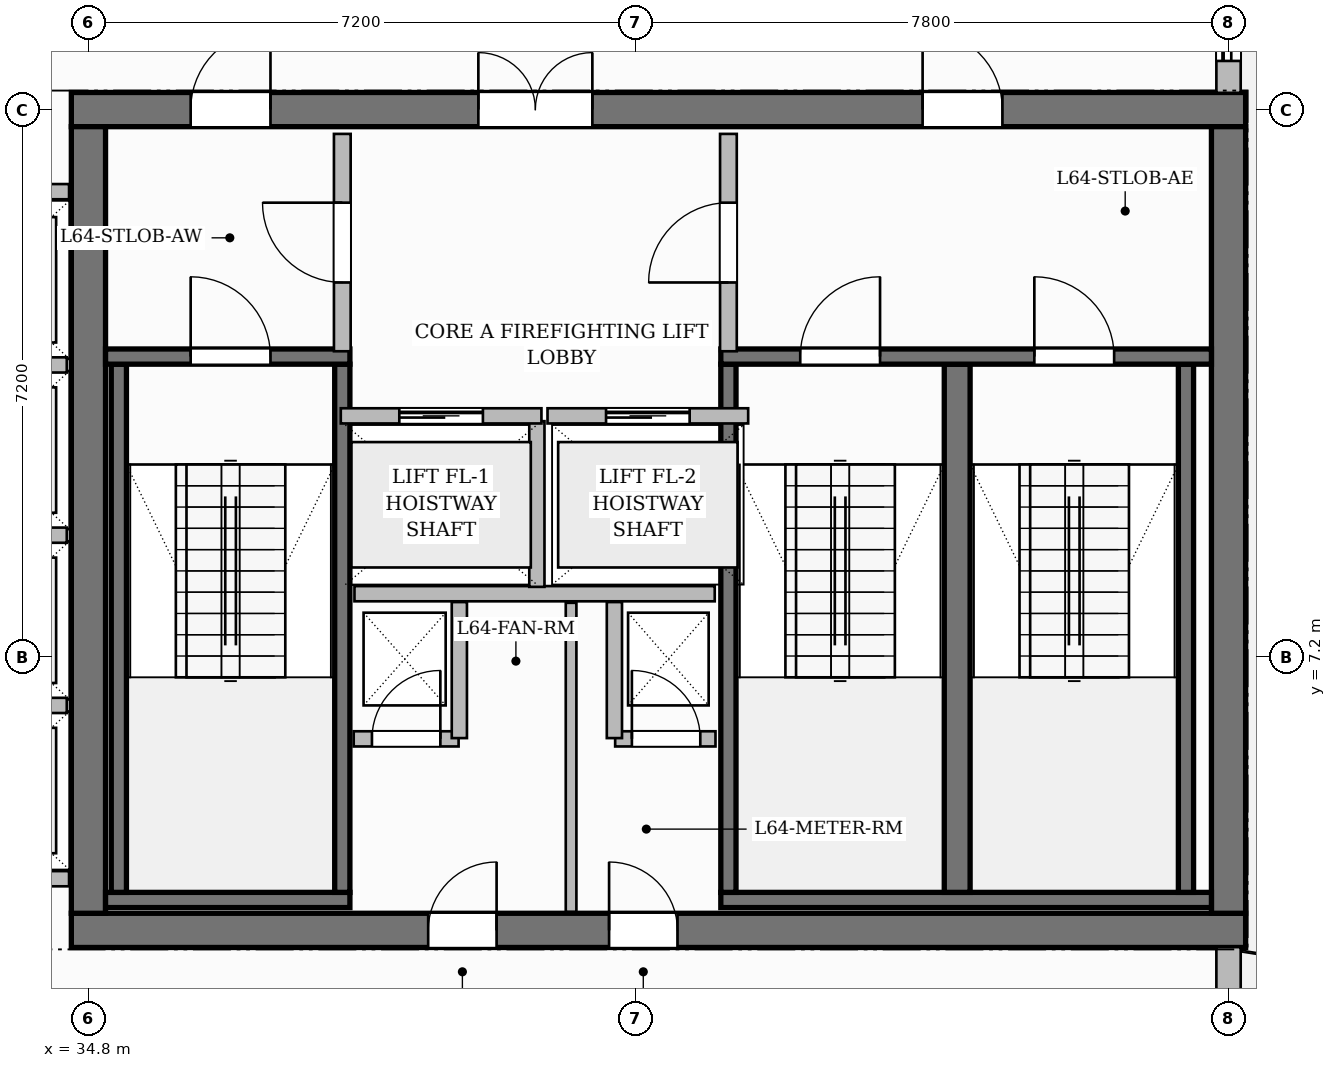
"""IFC4 building model, lengths in metres.
Left out: names, types, materials, properties, quantities, classifications, styles, units other than length and angle.
Written with IfcOpenShell. Run it as: python <this file> out.ifc"""

import sys

from ifc_helpers import new_model, si_unit, direction, frame, frame_2d, origin, place, context, subcontext, project, spatial, rectangle, extrude, source, transform, mapped, element, fill, save


model = new_model("IFC4")
c1 = context("Model", 3, precision=1e-05, world=origin(), true_north=direction((0.0, 1.0)))
c2 = subcontext(c1, "Body", "Model", "MODEL_VIEW")
j1 = project(units=[si_unit("LENGTHUNIT", "METRE"), si_unit("PLANEANGLEUNIT", "RADIAN")], contexts=[c1])
p1 = place(None, origin())
s1 = spatial("IfcSite", under=j1, at=p1, CompositionType="ELEMENT")
p2 = place(p1, origin())
s2 = spatial("IfcBuilding", under=s1, at=p2, CompositionType="ELEMENT")
p3 = place(p2, frame((0.0, 0.0, 255.8)))
s3 = spatial("IfcBuildingStorey", under=s2, at=p3, CompositionType="ELEMENT", Elevation=255.8)
p4 = place(p3, frame((34.575, 3.6, 0.0), z_axis=(0.0, 0.0, 1.0), x_axis=(1.0, 0.0, 0.0)))
e1 = element("IfcWall", 1, at=p4, inside=s3, PredefinedType="SHEAR", context=c2, shape_type="SweptSolid", body=[
    extrude(rectangle(XDim=15.45, YDim=0.45, at=frame_2d((7.725, 0.0))), origin(), (0.0, 0.0, 1.0), 3.85),
])
p5 = place(p4, frame((4.695, 0.0, 0.0)))
e2 = element("IfcOpeningElement", 2, at=p5, cuts=e1, PredefinedType="OPENING", context=c2, shape_type="SweptSolid", body=[
    extrude(rectangle(XDim=0.9, YDim=2.1, at=frame_2d((0.45, 1.05))), frame((0.0, 0.235, 0.0), z_axis=(0.0, -1.0, 0.0), x_axis=(1.0, 0.0, 0.0)), (0.0, 0.0, 1.0), 0.47),
])
p6 = place(p4, frame((7.075, 0.0, 0.0)))
e3 = element("IfcOpeningElement", 3, at=p6, cuts=e1, PredefinedType="OPENING", context=c2, shape_type="SweptSolid", body=[
    extrude(rectangle(XDim=0.9, YDim=2.1, at=frame_2d((0.45, 1.05))), frame((0.0, 0.235, 0.0), z_axis=(0.0, -1.0, 0.0), x_axis=(1.0, 0.0, 0.0)), (0.0, 0.0, 1.0), 0.47),
])
p7 = place(p3, frame((34.575, 14.4, 0.0), z_axis=(0.0, 0.0, 1.0), x_axis=(1.0, 0.0, 0.0)))
e4 = element("IfcWall", 4, at=p7, inside=s3, PredefinedType="SHEAR", context=c2, shape_type="SweptSolid", body=[
    extrude(rectangle(XDim=15.45, YDim=0.45, at=frame_2d((7.725, 0.0))), origin(), (0.0, 0.0, 1.0), 3.85),
])
p8 = place(p7, frame((5.355, 0.0, 0.0)))
e5 = element("IfcOpeningElement", 5, at=p8, cuts=e4, PredefinedType="OPENING", context=c2, shape_type="SweptSolid", body=[
    extrude(rectangle(XDim=1.5, YDim=2.2, at=frame_2d((0.75, 1.1))), frame((0.0, 0.235, 0.0), z_axis=(0.0, -1.0, 0.0), x_axis=(1.0, 0.0, 0.0)), (0.0, 0.0, 1.0), 0.47),
])
p9 = place(p7, frame((1.57, 0.0, 0.0)))
e6 = element("IfcOpeningElement", 6, at=p9, cuts=e4, PredefinedType="OPENING", context=c2, shape_type="SweptSolid", body=[
    extrude(rectangle(XDim=1.05, YDim=2.15, at=frame_2d((0.525, 1.075))), frame((0.0, 0.235, 0.0), z_axis=(0.0, -1.0, 0.0), x_axis=(1.0, 0.0, 0.0)), (0.0, 0.0, 1.0), 0.47),
])
p10 = place(p7, frame((11.2, 0.0, 0.0)))
e7 = element("IfcOpeningElement", 7, at=p10, cuts=e4, PredefinedType="OPENING", context=c2, shape_type="SweptSolid", body=[
    extrude(rectangle(XDim=1.05, YDim=2.15, at=frame_2d((0.525, 1.075))), frame((0.0, 0.235, 0.0), z_axis=(0.0, -1.0, 0.0), x_axis=(1.0, 0.0, 0.0)), (0.0, 0.0, 1.0), 0.47),
])
for number, where, z_axis, x_axis in (
    (8, (34.8, 3.825, 0.0), (0.0, 0.0, 1.0), (0.0, 1.0, 0.0)),
    (9, (49.8, 3.825, 0.0), (0.0, 0.0, 1.0), (0.0, 1.0, 0.0)),
):
    element("IfcWall", number, at=place(p3, frame(where, z_axis=z_axis, x_axis=x_axis)), inside=s3, PredefinedType="SHEAR", context=c2, shape_type="SweptSolid", body=[
        extrude(rectangle(XDim=10.35, YDim=0.45, at=frame_2d((5.175, 0.0))), origin(), (0.0, 0.0, 1.0), 3.85),
    ])
p11 = place(p3, frame((35.025, 4.0, 0.0), z_axis=(0.0, 0.0, 1.0), x_axis=(1.0, 0.0, 0.0)))
e10 = element("IfcWall", 10, at=p11, inside=s3, PredefinedType="SHEAR", context=c2, shape_type="SweptSolid", body=[
    extrude(rectangle(XDim=3.215, YDim=0.2, at=frame_2d((1.607, 0.0))), origin(), (0.0, 0.0, 1.0), 3.85),
])
for number, where, z_axis, x_axis in (
    (11, (35.2, 4.1, 0.0), (0.0, 0.0, 1.0), (0.0, 1.0, 0.0)),
    (12, (38.14, 4.1, 0.0), (0.0, 0.0, 1.0), (0.0, 1.0, 0.0)),
):
    element("IfcWall", number, at=place(p3, frame(where, z_axis=z_axis, x_axis=x_axis)), inside=s3, PredefinedType="SHEAR", context=c2, shape_type="SweptSolid", body=[
        extrude(rectangle(XDim=6.95, YDim=0.2, at=frame_2d((3.475, 0.0))), origin(), (0.0, 0.0, 1.0), 3.85),
    ])
p12 = place(p3, frame((35.025, 11.15, 0.0), z_axis=(0.0, 0.0, 1.0), x_axis=(1.0, 0.0, 0.0)))
e13 = element("IfcWall", 13, at=p12, inside=s3, PredefinedType="SHEAR", context=c2, shape_type="SweptSolid", body=[
    extrude(rectangle(XDim=3.215, YDim=0.2, at=frame_2d((1.607, 0.0))), origin(), (0.0, 0.0, 1.0), 3.85),
])
p13 = place(p12, frame((1.12, 0.0, 0.0)))
e14 = element("IfcOpeningElement", 14, at=p13, cuts=e13, PredefinedType="OPENING", context=c2, shape_type="SweptSolid", body=[
    extrude(rectangle(XDim=1.05, YDim=2.2, at=frame_2d((0.525, 1.1))), frame((0.0, 0.11, 0.0), z_axis=(0.0, -1.0, 0.0), x_axis=(1.0, 0.0, 0.0)), (0.0, 0.0, 1.0), 0.22),
])
p14 = place(p3, frame((43.12, 4.0, 0.0), z_axis=(0.0, 0.0, 1.0), x_axis=(1.0, 0.0, 0.0)))
e15 = element("IfcWall", 15, at=p14, inside=s3, PredefinedType="SHEAR", context=c2, shape_type="SweptSolid", body=[
    extrude(rectangle(XDim=6.455, YDim=0.2, at=frame_2d((3.228, 0.0))), origin(), (0.0, 0.0, 1.0), 3.85),
])
p15 = place(p3, frame((43.22, 4.1, 0.0), z_axis=(0.0, 0.0, 1.0), x_axis=(0.0, 1.0, 0.0)))
e16 = element("IfcWall", 16, at=p15, inside=s3, PredefinedType="SHEAR", context=c2, shape_type="SweptSolid", body=[
    extrude(rectangle(XDim=6.95, YDim=0.2, at=frame_2d((3.475, 0.0))), origin(), (0.0, 0.0, 1.0), 3.85),
])
p16 = place(p3, frame((46.23, 4.1, 0.0), z_axis=(0.0, 0.0, 1.0), x_axis=(0.0, 1.0, 0.0)))
e17 = element("IfcWall", 17, at=p16, inside=s3, PredefinedType="SHEAR", context=c2, shape_type="SweptSolid", body=[
    extrude(rectangle(XDim=6.95, YDim=0.34, at=frame_2d((3.475, 0.0))), origin(), (0.0, 0.0, 1.0), 3.85),
])
p17 = place(p3, frame((49.24, 4.1, 0.0), z_axis=(0.0, 0.0, 1.0), x_axis=(0.0, 1.0, 0.0)))
e18 = element("IfcWall", 18, at=p17, inside=s3, PredefinedType="SHEAR", context=c2, shape_type="SweptSolid", body=[
    extrude(rectangle(XDim=6.95, YDim=0.2, at=frame_2d((3.475, 0.0))), origin(), (0.0, 0.0, 1.0), 3.85),
])
p18 = place(p3, frame((43.12, 11.15, 0.0), z_axis=(0.0, 0.0, 1.0), x_axis=(1.0, 0.0, 0.0)))
e19 = element("IfcWall", 19, at=p18, inside=s3, PredefinedType="SHEAR", context=c2, shape_type="SweptSolid", body=[
    extrude(rectangle(XDim=6.455, YDim=0.2, at=frame_2d((3.228, 0.0))), origin(), (0.0, 0.0, 1.0), 3.85),
])
p19 = place(p18, frame((1.045, 0.0, 0.0)))
e20 = element("IfcOpeningElement", 20, at=p19, cuts=e19, PredefinedType="OPENING", context=c2, shape_type="SweptSolid", body=[
    extrude(rectangle(XDim=1.05, YDim=2.2, at=frame_2d((0.525, 1.1))), frame((0.0, 0.11, 0.0), z_axis=(0.0, -1.0, 0.0), x_axis=(1.0, 0.0, 0.0)), (0.0, 0.0, 1.0), 0.22),
])
p20 = place(p18, frame((4.125, 0.0, 0.0)))
e21 = element("IfcOpeningElement", 21, at=p20, cuts=e19, PredefinedType="OPENING", context=c2, shape_type="SweptSolid", body=[
    extrude(rectangle(XDim=1.05, YDim=2.2, at=frame_2d((0.525, 1.1))), frame((0.0, 0.11, 0.0), z_axis=(0.0, -1.0, 0.0), x_axis=(1.0, 0.0, 0.0)), (0.0, 0.0, 1.0), 0.22),
])
p21 = place(p3, frame((38.3, 8.03, 0.0), z_axis=(0.0, 0.0, 1.0), x_axis=(1.0, 0.0, 0.0)))
e22 = element("IfcWall", 22, at=p21, inside=s3, PredefinedType="PARTITIONING", context=c2, shape_type="SweptSolid", body=[
    extrude(rectangle(XDim=4.74, YDim=0.2, at=frame_2d((2.37, 0.0))), origin(), (0.0, 0.0, 1.0), 3.6),
])
p22 = place(p3, frame((40.7, 8.12, 0.0), z_axis=(0.0, 0.0, 1.0), x_axis=(0.0, 1.0, 0.0)))
e23 = element("IfcWall", 23, at=p22, inside=s3, PredefinedType="PARTITIONING", context=c2, shape_type="SweptSolid", body=[
    extrude(rectangle(XDim=2.18, YDim=0.2, at=frame_2d((1.09, 0.0))), origin(), (0.0, 0.0, 1.0), 3.6),
])
p23 = place(p3, frame((38.14, 11.22, 0.0), z_axis=(0.0, 0.0, 1.0), x_axis=(0.0, 1.0, 0.0)))
e24 = element("IfcWall", 24, at=p23, inside=s3, PredefinedType="PARTITIONING", context=c2, shape_type="SweptSolid", body=[
    extrude(rectangle(XDim=2.86, YDim=0.22, at=frame_2d((1.43, 0.0))), origin(), (0.0, 0.0, 1.0), 3.6),
])
p24 = place(p23, frame((0.905, 0.0, 0.0)))
e25 = element("IfcOpeningElement", 25, at=p24, cuts=e24, PredefinedType="OPENING", context=c2, shape_type="SweptSolid", body=[
    extrude(rectangle(XDim=1.05, YDim=2.15, at=frame_2d((0.525, 1.075))), frame((0.0, 0.12, 0.0), z_axis=(0.0, -1.0, 0.0), x_axis=(1.0, 0.0, 0.0)), (0.0, 0.0, 1.0), 0.24),
])
p25 = place(p3, frame((43.22, 11.22, 0.0), z_axis=(0.0, 0.0, 1.0), x_axis=(0.0, 1.0, 0.0)))
e26 = element("IfcWall", 26, at=p25, inside=s3, PredefinedType="PARTITIONING", context=c2, shape_type="SweptSolid", body=[
    extrude(rectangle(XDim=2.86, YDim=0.22, at=frame_2d((1.43, 0.0))), origin(), (0.0, 0.0, 1.0), 3.6),
])
p26 = place(p25, frame((0.905, 0.0, 0.0)))
e27 = element("IfcOpeningElement", 27, at=p26, cuts=e26, PredefinedType="OPENING", context=c2, shape_type="SweptSolid", body=[
    extrude(rectangle(XDim=1.05, YDim=2.15, at=frame_2d((0.525, 1.075))), frame((0.0, 0.12, 0.0), z_axis=(0.0, -1.0, 0.0), x_axis=(1.0, 0.0, 0.0)), (0.0, 0.0, 1.0), 0.24),
])
p27 = place(p3, frame((38.29, 6.12, 0.0), z_axis=(0.0, 0.0, 1.0), x_axis=(1.0, 0.0, 0.0)))
e28 = element("IfcWall", 28, at=p27, inside=s3, PredefinedType="PARTITIONING", context=c2, shape_type="SweptSolid", body=[
    extrude(rectangle(XDim=1.38, YDim=0.2, at=frame_2d((0.69, 0.0))), origin(), (0.0, 0.0, 1.0), 3.6),
])
p28 = place(p27, frame((0.24, 0.0, 0.0)))
e29 = element("IfcOpeningElement", 29, at=p28, cuts=e28, PredefinedType="OPENING", context=c2, shape_type="SweptSolid", body=[
    extrude(rectangle(XDim=0.9, YDim=2.1, at=frame_2d((0.45, 1.05))), frame((0.0, 0.11, 0.0), z_axis=(0.0, -1.0, 0.0), x_axis=(1.0, 0.0, 0.0)), (0.0, 0.0, 1.0), 0.22),
])
p29 = place(p3, frame((39.68, 6.13, 0.0), z_axis=(0.0, 0.0, 1.0), x_axis=(0.0, 1.0, 0.0)))
e30 = element("IfcWall", 30, at=p29, inside=s3, PredefinedType="PARTITIONING", context=c2, shape_type="SweptSolid", body=[
    extrude(rectangle(XDim=1.79, YDim=0.2, at=frame_2d((0.895, 0.0))), origin(), (0.0, 0.0, 1.0), 3.6),
])
p30 = place(p3, frame((41.73, 6.12, 0.0), z_axis=(0.0, 0.0, 1.0), x_axis=(1.0, 0.0, 0.0)))
e31 = element("IfcWall", 31, at=p30, inside=s3, PredefinedType="PARTITIONING", context=c2, shape_type="SweptSolid", body=[
    extrude(rectangle(XDim=1.32, YDim=0.2, at=frame_2d((0.66, 0.0))), origin(), (0.0, 0.0, 1.0), 3.6),
])
p31 = place(p30, frame((0.22, 0.0, 0.0)))
e32 = element("IfcOpeningElement", 32, at=p31, cuts=e31, PredefinedType="OPENING", context=c2, shape_type="SweptSolid", body=[
    extrude(rectangle(XDim=0.9, YDim=2.1, at=frame_2d((0.45, 1.05))), frame((0.0, 0.11, 0.0), z_axis=(0.0, -1.0, 0.0), x_axis=(1.0, 0.0, 0.0)), (0.0, 0.0, 1.0), 0.22),
])
p32 = place(p3, frame((41.72, 6.13, 0.0), z_axis=(0.0, 0.0, 1.0), x_axis=(0.0, 1.0, 0.0)))
e33 = element("IfcWall", 33, at=p32, inside=s3, PredefinedType="PARTITIONING", context=c2, shape_type="SweptSolid", body=[
    extrude(rectangle(XDim=1.79, YDim=0.2, at=frame_2d((0.895, 0.0))), origin(), (0.0, 0.0, 1.0), 3.6),
])
p33 = place(p3, frame((41.15, 3.845, 0.0), z_axis=(0.0, 0.0, 1.0), x_axis=(0.0, 1.0, 0.0)))
e34 = element("IfcWall", 34, at=p33, inside=s3, PredefinedType="PARTITIONING", context=c2, shape_type="SweptSolid", body=[
    extrude(rectangle(XDim=4.065, YDim=0.14, at=frame_2d((2.032, 0.0))), origin(), (0.0, 0.0, 1.0), 3.6),
])
for number, where, z_axis, x_axis in (
    (35, (32.16, 4.28, 0.0), (0.0, 0.0, 1.0), (1.0, 0.0, 0.0)),
    (36, (32.16, 13.32, 0.0), (0.0, 0.0, 1.0), (1.0, 0.0, 0.0)),
):
    element("IfcWall", number, at=place(p3, frame(where, z_axis=z_axis, x_axis=x_axis)), inside=s3, PredefinedType="PARTITIONING", context=c2, shape_type="SweptSolid", body=[
        extrude(rectangle(XDim=2.385, YDim=0.2, at=frame_2d((1.192, 0.0))), origin(), (0.0, 0.0, 1.0), 3.6),
    ])
for number, where, z_axis, x_axis in (
    (37, (32.26, 6.56, 0.0), (0.0, 0.0, 1.0), (1.0, 0.0, 0.0)),
    (38, (32.26, 8.8, 0.0), (0.0, 0.0, 1.0), (1.0, 0.0, 0.0)),
    (39, (32.26, 11.04, 0.0), (0.0, 0.0, 1.0), (1.0, 0.0, 0.0)),
):
    element("IfcWall", number, at=place(p3, frame(where, z_axis=z_axis, x_axis=x_axis)), inside=s3, PredefinedType="PARTITIONING", context=c2, shape_type="SweptSolid", body=[
        extrude(rectangle(XDim=2.255, YDim=0.2, at=frame_2d((1.127, 0.0))), origin(), (0.0, 0.0, 1.0), 3.6),
    ])
p34 = place(p3, frame((38.12, 10.37, 0.0), z_axis=(0.0, 0.0, 1.0), x_axis=(1.0, 0.0, 0.0)))
e40 = element("IfcWall", 40, at=p34, inside=s3, PredefinedType="PARTITIONING", context=c2, shape_type="SweptSolid", body=[
    extrude(rectangle(XDim=2.64, YDim=0.2, at=frame_2d((1.32, 0.0))), origin(), (0.0, 0.0, 1.0), 3.6),
])
p35 = place(p34, frame((0.77, 0.0, 0.0)))
e41 = element("IfcOpeningElement", 41, at=p35, cuts=e40, PredefinedType="OPENING", context=c2, shape_type="SweptSolid", body=[
    extrude(rectangle(XDim=1.1, YDim=2.2, at=frame_2d((0.55, 1.1))), frame((0.0, 0.11, 0.0), z_axis=(0.0, -1.0, 0.0), x_axis=(1.0, 0.0, 0.0)), (0.0, 0.0, 1.0), 0.22),
])
p36 = place(p3, frame((40.84, 10.37, 0.0), z_axis=(0.0, 0.0, 1.0), x_axis=(1.0, 0.0, 0.0)))
e42 = element("IfcWall", 42, at=p36, inside=s3, PredefinedType="PARTITIONING", context=c2, shape_type="SweptSolid", body=[
    extrude(rectangle(XDim=2.64, YDim=0.2, at=frame_2d((1.32, 0.0))), origin(), (0.0, 0.0, 1.0), 3.6),
])
p37 = place(p36, frame((0.77, 0.0, 0.0)))
e43 = element("IfcOpeningElement", 43, at=p37, cuts=e42, PredefinedType="OPENING", context=c2, shape_type="SweptSolid", body=[
    extrude(rectangle(XDim=1.1, YDim=2.2, at=frame_2d((0.55, 1.1))), frame((0.0, 0.11, 0.0), z_axis=(0.0, -1.0, 0.0), x_axis=(1.0, 0.0, 0.0)), (0.0, 0.0, 1.0), 0.22),
])
p38 = place(p3, frame((49.8, 0.05, 0.0), z_axis=(0.0, 0.0, 1.0), x_axis=(0.0, 1.0, 0.0)))
e44 = element("IfcWall", 44, at=p38, inside=s3, PredefinedType="SOLIDWALL", context=c2, shape_type="SweptSolid", body=[
    extrude(rectangle(XDim=3.33, YDim=0.32, at=frame_2d((1.665, 0.0))), origin(), (0.0, 0.0, 1.0), 3.6),
])
p39 = place(p3, frame((49.8, 14.62, 0.0), z_axis=(0.0, 0.0, 1.0), x_axis=(0.0, 1.0, 0.0)))
e45 = element("IfcWall", 45, at=p39, inside=s3, PredefinedType="SOLIDWALL", context=c2, shape_type="SweptSolid", body=[
    extrude(rectangle(XDim=6.93, YDim=0.32, at=frame_2d((3.465, 0.0))), origin(), (0.0, 0.0, 1.0), 3.135),
])
p40 = place(p39, frame((0.42, 0.0, 0.0)))
e46 = element("IfcOpeningElement", 46, at=p40, cuts=e45, PredefinedType="OPENING", context=c2, shape_type="SweptSolid", body=[
    extrude(rectangle(XDim=1.2, YDim=2.2, at=frame_2d((0.6, 1.1))), frame((0.0, 0.17, 0.0), z_axis=(0.0, -1.0, 0.0), x_axis=(1.0, 0.0, 0.0)), (0.0, 0.0, 1.0), 0.34),
])
p41 = place(p39, frame((3.384, 0.0, 0.8)))
e47 = element("IfcOpeningElement", 47, at=p41, cuts=e45, PredefinedType="OPENING", context=c2, shape_type="SweptSolid", body=[
    extrude(rectangle(XDim=1.8, YDim=1.85, at=frame_2d((0.9, 0.925))), frame((0.0, 0.17, 0.0), z_axis=(0.0, -1.0, 0.0), x_axis=(1.0, 0.0, 0.0)), (0.0, 0.0, 1.0), 0.34),
])
m1 = source(origin(), c2, "Body", "SweptSolid", [
    extrude(rectangle(XDim=1.05, YDim=2.2, at=frame_2d((0.525, 1.1))), frame((0.0, 0.025, 0.0), z_axis=(0.0, -1.0, 0.0), x_axis=(1.0, 0.0, 0.0)), (0.0, 0.0, 1.0), 0.05),
])
p42 = place(p13, origin())
e48 = element("IfcDoor", 48, at=p42, inside=s3, OperationType="SINGLE_SWING_LEFT", PredefinedType="DOOR", context=c2, shape_type="MappedRepresentation", body=[
    mapped(m1, transform((0.0, 0.0, 0.0), scale=1.0)),
])
fill(e14, e48)
p43 = place(p19, origin())
e49 = element("IfcDoor", 49, at=p43, inside=s3, OperationType="SINGLE_SWING_RIGHT", PredefinedType="DOOR", context=c2, shape_type="MappedRepresentation", body=[
    mapped(m1, transform((0.0, 0.0, 0.0), scale=1.0)),
])
fill(e20, e49)
p44 = place(p20, origin())
e50 = element("IfcDoor", 50, at=p44, inside=s3, OperationType="SINGLE_SWING_LEFT", PredefinedType="DOOR", context=c2, shape_type="MappedRepresentation", body=[
    mapped(m1, transform((0.0, 0.0, 0.0), scale=1.0)),
])
fill(e21, e50)
m2 = source(origin(), c2, "Body", "SweptSolid", [
    extrude(rectangle(XDim=1.05, YDim=2.15, at=frame_2d((0.525, 1.075))), frame((0.0, 0.025, 0.0), z_axis=(0.0, -1.0, 0.0), x_axis=(1.0, 0.0, 0.0)), (0.0, 0.0, 1.0), 0.05),
])
p45 = place(p24, origin())
e51 = element("IfcDoor", 51, at=p45, inside=s3, OperationType="SINGLE_SWING_RIGHT", PredefinedType="DOOR", context=c2, shape_type="MappedRepresentation", body=[
    mapped(m2, transform((0.0, 0.0, 0.0), scale=1.0)),
])
fill(e25, e51)
p46 = place(p26, origin())
e52 = element("IfcDoor", 52, at=p46, inside=s3, OperationType="SINGLE_SWING_LEFT", PredefinedType="DOOR", context=c2, shape_type="MappedRepresentation", body=[
    mapped(m2, transform((0.0, 0.0, 0.0), scale=1.0)),
])
fill(e27, e52)
m3 = source(origin(), c2, "Body", "SweptSolid", [
    extrude(rectangle(XDim=1.5, YDim=2.2, at=frame_2d((0.75, 1.1))), frame((0.0, 0.025, 0.0), z_axis=(0.0, -1.0, 0.0), x_axis=(1.0, 0.0, 0.0)), (0.0, 0.0, 1.0), 0.05),
])
p47 = place(p8, origin())
e53 = element("IfcDoor", 53, at=p47, inside=s3, OperationType="DOUBLE_DOOR_SINGLE_SWING", PredefinedType="DOOR", context=c2, shape_type="MappedRepresentation", body=[
    mapped(m3, transform((0.0, 0.0, 0.0), scale=1.0)),
])
fill(e5, e53)
p48 = place(p9, origin())
e54 = element("IfcDoor", 54, at=p48, inside=s3, OperationType="SINGLE_SWING_RIGHT", PredefinedType="DOOR", context=c2, shape_type="MappedRepresentation", body=[
    mapped(m2, transform((0.0, 0.0, 0.0), scale=1.0)),
])
fill(e6, e54)
p49 = place(p10, origin())
e55 = element("IfcDoor", 55, at=p49, inside=s3, OperationType="SINGLE_SWING_LEFT", PredefinedType="DOOR", context=c2, shape_type="MappedRepresentation", body=[
    mapped(m2, transform((0.0, 0.0, 0.0), scale=1.0)),
])
fill(e7, e55)
m4 = source(origin(), c2, "Body", "SweptSolid", [
    extrude(rectangle(XDim=0.9, YDim=2.1, at=frame_2d((0.45, 1.05))), frame((0.0, 0.025, 0.0), z_axis=(0.0, -1.0, 0.0), x_axis=(1.0, 0.0, 0.0)), (0.0, 0.0, 1.0), 0.05),
])
p50 = place(p28, origin())
e56 = element("IfcDoor", 56, at=p50, inside=s3, OperationType="SINGLE_SWING_RIGHT", PredefinedType="DOOR", context=c2, shape_type="MappedRepresentation", body=[
    mapped(m4, transform((0.0, 0.0, 0.0), scale=1.0)),
])
fill(e29, e56)
p51 = place(p31, origin())
e57 = element("IfcDoor", 57, at=p51, inside=s3, OperationType="SINGLE_SWING_LEFT", PredefinedType="DOOR", context=c2, shape_type="MappedRepresentation", body=[
    mapped(m4, transform((0.0, 0.0, 0.0), scale=1.0)),
])
fill(e32, e57)
p52 = place(p5, origin())
e58 = element("IfcDoor", 58, at=p52, inside=s3, OperationType="SINGLE_SWING_RIGHT", PredefinedType="DOOR", context=c2, shape_type="MappedRepresentation", body=[
    mapped(m4, transform((0.0, 0.0, 0.0), scale=1.0)),
])
fill(e2, e58)
p53 = place(p6, origin())
e59 = element("IfcDoor", 59, at=p53, inside=s3, OperationType="SINGLE_SWING_LEFT", PredefinedType="DOOR", context=c2, shape_type="MappedRepresentation", body=[
    mapped(m4, transform((0.0, 0.0, 0.0), scale=1.0)),
])
fill(e3, e59)
m5 = source(origin(), c2, "Body", "SweptSolid", [
    extrude(rectangle(XDim=1.1, YDim=2.2, at=frame_2d((0.55, 1.1))), frame((0.0, 0.025, 0.0), z_axis=(0.0, -1.0, 0.0), x_axis=(1.0, 0.0, 0.0)), (0.0, 0.0, 1.0), 0.05),
])
p54 = place(p35, origin())
e60 = element("IfcDoor", 60, at=p54, inside=s3, OperationType="SLIDING_TO_LEFT", PredefinedType="DOOR", context=c2, shape_type="MappedRepresentation", body=[
    mapped(m5, transform((0.0, 0.0, 0.0), scale=1.0)),
])
fill(e41, e60)
p55 = place(p37, origin())
e61 = element("IfcDoor", 61, at=p55, inside=s3, OperationType="SLIDING_TO_LEFT", PredefinedType="DOOR", context=c2, shape_type="MappedRepresentation", body=[
    mapped(m5, transform((0.0, 0.0, 0.0), scale=1.0)),
])
fill(e43, e61)
m6 = source(origin(), c2, "Body", "SweptSolid", [
    extrude(rectangle(XDim=1.2, YDim=2.2, at=frame_2d((0.6, 1.1))), frame((0.0, 0.025, 0.0), z_axis=(0.0, -1.0, 0.0), x_axis=(1.0, 0.0, 0.0)), (0.0, 0.0, 1.0), 0.05),
])
p56 = place(p40, origin())
e62 = element("IfcDoor", 62, at=p56, inside=s3, OperationType="SLIDING_TO_LEFT", PredefinedType="DOOR", context=c2, shape_type="MappedRepresentation", body=[
    mapped(m6, transform((0.0, 0.0, 0.0), scale=1.0)),
])
fill(e46, e62)
save(model, sys.argv[1])
